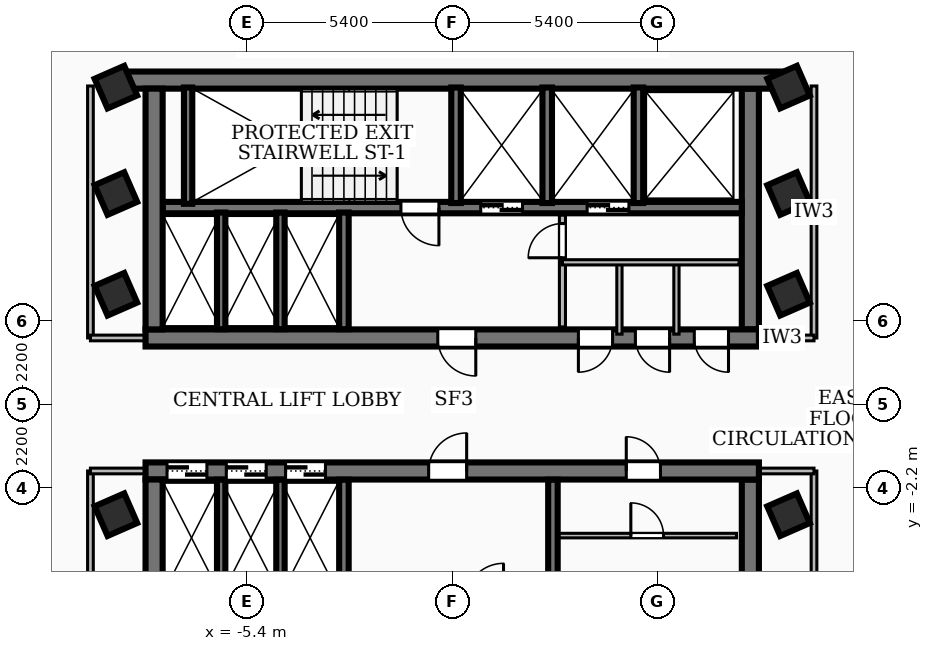
"""IFC4 building model, lengths in metres.
Left out: names, types, materials, properties, quantities, classifications, styles, units other than length and angle.
Written with IfcOpenShell. Run it as: python <this file> out.ifc"""

import sys

from ifc_helpers import new_model, si_unit, direction, frame, frame_2d, origin, origin_2d, place, context, subcontext, project, spatial, rectangle, extrude, element, fill, save


model = new_model("IFC4")
c1 = context("Model", 3, precision=1e-05, world=origin(), true_north=direction((0.0, 1.0)))
c2 = subcontext(c1, "Body", "Model", "MODEL_VIEW")
j1 = project(units=[si_unit("LENGTHUNIT", "METRE"), si_unit("PLANEANGLEUNIT", "RADIAN")], contexts=[c1])
p1 = place(None, origin())
s1 = spatial("IfcSite", under=j1, at=p1, CompositionType="ELEMENT")
p2 = place(p1, origin())
s2 = spatial("IfcBuilding", under=s1, at=p2, CompositionType="ELEMENT")
p3 = place(p2, frame((0.0, 0.0, 181.08)))
s3 = spatial("IfcBuildingStorey", under=s2, at=p3, CompositionType="ELEMENT", Elevation=181.08)
p4 = place(p3, frame((-8.78, 8.535, 0.0), z_axis=(0.0, 0.0, 1.0), x_axis=(1.0, 0.0, 0.0)))
e1 = element("IfcWall", 1, at=p4, inside=s3, PredefinedType="SHEAR", context=c2, shape_type="SweptSolid", body=[
    extrude(rectangle(XDim=17.56, YDim=0.45, at=frame_2d((8.78, 0.0))), origin(), (0.0, 0.0, 1.0), 3.34),
])
p5 = place(p3, frame((8.07, 1.75, 0.0), z_axis=(0.0, 0.0, 1.0), x_axis=(-1.0, 0.0, 0.0)))
e2 = element("IfcWall", 2, at=p5, inside=s3, PredefinedType="SHEAR", context=c2, shape_type="SweptSolid", body=[
    extrude(rectangle(XDim=16.14, YDim=0.45, at=frame_2d((8.07, 0.0))), origin(), (0.0, 0.0, 1.0), 3.34),
])
p6 = place(p5, frame((7.45, 0.0, 0.0)))
e3 = element("IfcOpeningElement", 3, at=p6, cuts=e2, PredefinedType="OPENING", context=c2, shape_type="SweptSolid", body=[
    extrude(rectangle(XDim=1.0, YDim=2.1, at=frame_2d((0.5, 1.05))), frame((0.0, 0.235, 0.0), z_axis=(0.0, -1.0, 0.0), x_axis=(1.0, 0.0, 0.0)), (0.0, 0.0, 1.0), 0.47),
])
p7 = place(p5, frame((3.85, 0.0, 0.0)))
e4 = element("IfcOpeningElement", 4, at=p7, cuts=e2, PredefinedType="OPENING", context=c2, shape_type="SweptSolid", body=[
    extrude(rectangle(XDim=0.9, YDim=2.06, at=frame_2d((0.45, 1.03))), frame((0.0, 0.235, 0.0), z_axis=(0.0, -1.0, 0.0), x_axis=(1.0, 0.0, 0.0)), (0.0, 0.0, 1.0), 0.47),
])
p8 = place(p5, frame((2.35, 0.0, 0.0)))
e5 = element("IfcOpeningElement", 5, at=p8, cuts=e2, PredefinedType="OPENING", context=c2, shape_type="SweptSolid", body=[
    extrude(rectangle(XDim=0.9, YDim=2.06, at=frame_2d((0.45, 1.03))), frame((0.0, 0.235, 0.0), z_axis=(0.0, -1.0, 0.0), x_axis=(1.0, 0.0, 0.0)), (0.0, 0.0, 1.0), 0.47),
])
p9 = place(p5, frame((0.8, 0.0, 0.0)))
e6 = element("IfcOpeningElement", 6, at=p9, cuts=e2, PredefinedType="OPENING", context=c2, shape_type="SweptSolid", body=[
    extrude(rectangle(XDim=0.9, YDim=2.06, at=frame_2d((0.45, 1.03))), frame((0.0, 0.235, 0.0), z_axis=(0.0, -1.0, 0.0), x_axis=(1.0, 0.0, 0.0)), (0.0, 0.0, 1.0), 0.47),
])
for number, where, z_axis, x_axis in (
    (7, (-7.845, 1.975, 0.0), (0.0, 0.0, 1.0), (0.0, 1.0, 0.0)),
    (8, (7.845, 8.31, 0.0), (0.0, 0.0, 1.0), (0.0, -1.0, 0.0)),
):
    element("IfcWall", number, at=place(p3, frame(where, z_axis=z_axis, x_axis=x_axis)), inside=s3, PredefinedType="SHEAR", context=c2, shape_type="SweptSolid", body=[
        extrude(rectangle(XDim=6.335, YDim=0.45, at=frame_2d((3.167, 0.0))), origin(), (0.0, 0.0, 1.0), 3.34),
    ])
p10 = place(p3, frame((7.62, 5.18, 0.0), z_axis=(0.0, 0.0, 1.0), x_axis=(-1.0, 0.0, 0.0)))
e9 = element("IfcWall", 9, at=p10, inside=s3, PredefinedType="SOLIDWALL", context=c2, shape_type="SweptSolid", body=[
    extrude(rectangle(XDim=15.24, YDim=0.3, at=frame_2d((7.62, 0.0))), origin(), (0.0, 0.0, 1.0), 3.34),
])
p11 = place(p10, frame((5.77, 0.0, 0.0)))
e10 = element("IfcOpeningElement", 10, at=p11, cuts=e9, PredefinedType="OPENING", context=c2, shape_type="SweptSolid", body=[
    extrude(rectangle(XDim=1.1, YDim=2.15, at=frame_2d((0.55, 1.075))), frame((0.0, 0.16, 0.0), z_axis=(0.0, -1.0, 0.0), x_axis=(1.0, 0.0, 0.0)), (0.0, 0.0, 1.0), 0.32),
])
p12 = place(p10, frame((2.97, 0.0, 0.0)))
e11 = element("IfcOpeningElement", 11, at=p12, cuts=e9, PredefinedType="OPENING", context=c2, shape_type="SweptSolid", body=[
    extrude(rectangle(XDim=1.1, YDim=2.15, at=frame_2d((0.55, 1.075))), frame((0.0, 0.16, 0.0), z_axis=(0.0, -1.0, 0.0), x_axis=(1.0, 0.0, 0.0)), (0.0, 0.0, 1.0), 0.32),
])
p13 = place(p10, frame((7.97, 0.0, 0.0)))
e12 = element("IfcOpeningElement", 12, at=p13, cuts=e9, PredefinedType="OPENING", context=c2, shape_type="SweptSolid", body=[
    extrude(rectangle(XDim=1.0, YDim=2.1, at=frame_2d((0.5, 1.05))), frame((0.0, 0.16, 0.0), z_axis=(0.0, -1.0, 0.0), x_axis=(1.0, 0.0, 0.0)), (0.0, 0.0, 1.0), 0.32),
])
p14 = place(p3, frame((-8.07, -1.75, 0.0), z_axis=(0.0, 0.0, 1.0), x_axis=(1.0, 0.0, 0.0)))
e13 = element("IfcWall", 13, at=p14, inside=s3, PredefinedType="SHEAR", context=c2, shape_type="SweptSolid", body=[
    extrude(rectangle(XDim=16.14, YDim=0.45, at=frame_2d((8.07, 0.0))), origin(), (0.0, 0.0, 1.0), 3.34),
])
p15 = place(p14, frame((7.45, 0.0, 0.0)))
e14 = element("IfcOpeningElement", 14, at=p15, cuts=e13, PredefinedType="OPENING", context=c2, shape_type="SweptSolid", body=[
    extrude(rectangle(XDim=1.0, YDim=2.1, at=frame_2d((0.5, 1.05))), frame((0.0, 0.235, 0.0), z_axis=(0.0, -1.0, 0.0), x_axis=(1.0, 0.0, 0.0)), (0.0, 0.0, 1.0), 0.47),
])
p16 = place(p14, frame((12.65, 0.0, 0.0)))
e15 = element("IfcOpeningElement", 15, at=p16, cuts=e13, PredefinedType="OPENING", context=c2, shape_type="SweptSolid", body=[
    extrude(rectangle(XDim=0.9, YDim=2.06, at=frame_2d((0.45, 1.03))), frame((0.0, 0.235, 0.0), z_axis=(0.0, -1.0, 0.0), x_axis=(1.0, 0.0, 0.0)), (0.0, 0.0, 1.0), 0.47),
])
p17 = place(p14, frame((0.565, 0.0, 0.0)))
e16 = element("IfcOpeningElement", 16, at=p17, cuts=e13, PredefinedType="OPENING", context=c2, shape_type="SweptSolid", body=[
    extrude(rectangle(XDim=1.05, YDim=2.15, at=frame_2d((0.525, 1.075))), frame((0.0, 0.235, 0.0), z_axis=(0.0, -1.0, 0.0), x_axis=(1.0, 0.0, 0.0)), (0.0, 0.0, 1.0), 0.47),
])
p18 = place(p14, frame((2.125, 0.0, 0.0)))
e17 = element("IfcOpeningElement", 17, at=p18, cuts=e13, PredefinedType="OPENING", context=c2, shape_type="SweptSolid", body=[
    extrude(rectangle(XDim=1.05, YDim=2.15, at=frame_2d((0.525, 1.075))), frame((0.0, 0.235, 0.0), z_axis=(0.0, -1.0, 0.0), x_axis=(1.0, 0.0, 0.0)), (0.0, 0.0, 1.0), 0.47),
])
p19 = place(p14, frame((3.685, 0.0, 0.0)))
e18 = element("IfcOpeningElement", 18, at=p19, cuts=e13, PredefinedType="OPENING", context=c2, shape_type="SweptSolid", body=[
    extrude(rectangle(XDim=1.05, YDim=2.15, at=frame_2d((0.525, 1.075))), frame((0.0, 0.235, 0.0), z_axis=(0.0, -1.0, 0.0), x_axis=(1.0, 0.0, 0.0)), (0.0, 0.0, 1.0), 0.47),
])
for number, where, z_axis, x_axis in (
    (19, (-7.845, -8.31, 0.0), (0.0, 0.0, 1.0), (0.0, 1.0, 0.0)),
    (20, (7.845, -1.975, 0.0), (0.0, 0.0, 1.0), (0.0, -1.0, 0.0)),
):
    element("IfcWall", number, at=place(p3, frame(where, z_axis=z_axis, x_axis=x_axis)), inside=s3, PredefinedType="SHEAR", context=c2, shape_type="SweptSolid", body=[
        extrude(rectangle(XDim=6.335, YDim=0.45, at=frame_2d((3.167, 0.0))), origin(), (0.0, 0.0, 1.0), 3.34),
    ])
p20 = place(p3, frame((-6.95, 5.28, 0.0), z_axis=(0.0, 0.0, 1.0), x_axis=(0.0, 1.0, 0.0)))
e21 = element("IfcWall", 21, at=p20, inside=s3, PredefinedType="SOLIDWALL", context=c2, shape_type="SweptSolid", body=[
    extrude(rectangle(XDim=3.06, YDim=0.22, at=frame_2d((1.53, 0.0))), origin(), (0.0, 0.0, 1.0), 3.34),
])
for number, where, z_axis, x_axis in (
    (22, (0.1, 5.3, 0.0), (0.0, 0.0, 1.0), (0.0, 1.0, 0.0)),
    (23, (2.5, 5.3, 0.0), (0.0, 0.0, 1.0), (0.0, 1.0, 0.0)),
    (24, (4.9, 5.3, 0.0), (0.0, 0.0, 1.0), (0.0, 1.0, 0.0)),
):
    element("IfcWall", number, at=place(p3, frame(where, z_axis=z_axis, x_axis=x_axis)), inside=s3, PredefinedType="SOLIDWALL", context=c2, shape_type="SweptSolid", body=[
        extrude(rectangle(XDim=3.04, YDim=0.25, at=frame_2d((1.52, 0.0))), origin(), (0.0, 0.0, 1.0), 3.34),
    ])
for number, where, z_axis, x_axis in (
    (25, (-2.85, 1.98, 0.0), (0.0, 0.0, 1.0), (0.0, 1.0, 0.0)),
    (26, (-2.85, -5.05, 0.0), (0.0, 0.0, 1.0), (0.0, 1.0, 0.0)),
    (27, (2.65, -5.05, 0.0), (0.0, 0.0, 1.0), (0.0, 1.0, 0.0)),
):
    element("IfcWall", number, at=place(p3, frame(where, z_axis=z_axis, x_axis=x_axis)), inside=s3, PredefinedType="SOLIDWALL", context=c2, shape_type="SweptSolid", body=[
        extrude(rectangle(XDim=3.07, YDim=0.25, at=frame_2d((1.535, 0.0))), origin(), (0.0, 0.0, 1.0), 3.34),
    ])
for number, where, z_axis, x_axis in (
    (28, (-6.08, 1.98, 0.0), (0.0, 0.0, 1.0), (0.0, 1.0, 0.0)),
    (29, (-4.52, 1.98, 0.0), (0.0, 0.0, 1.0), (0.0, 1.0, 0.0)),
    (30, (-6.08, -5.05, 0.0), (0.0, 0.0, 1.0), (0.0, 1.0, 0.0)),
    (31, (-4.52, -5.05, 0.0), (0.0, 0.0, 1.0), (0.0, 1.0, 0.0)),
):
    element("IfcWall", number, at=place(p3, frame(where, z_axis=z_axis, x_axis=x_axis)), inside=s3, PredefinedType="SOLIDWALL", context=c2, shape_type="SweptSolid", body=[
        extrude(rectangle(XDim=3.07, YDim=0.22, at=frame_2d((1.535, 0.0))), origin(), (0.0, 0.0, 1.0), 3.34),
    ])
for number, where, z_axis, x_axis in (
    (32, (-8.85, -2.9, 0.0), (0.0, 0.0, 1.0), (0.916, 0.4, 0.0)),
    (33, (-8.85, 2.9, 0.0), (0.0, 0.0, 1.0), (0.916, 0.4, 0.0)),
    (34, (-8.85, 5.55, 0.0), (0.0, 0.0, 1.0), (0.916, 0.4, 0.0)),
    (35, (8.85, -2.9, 0.0), (0.0, 0.0, 1.0), (0.916, 0.4, 0.0)),
    (36, (8.85, 2.9, 0.0), (0.0, 0.0, 1.0), (0.916, 0.4, 0.0)),
    (37, (8.85, 5.55, 0.0), (0.0, 0.0, 1.0), (0.916, 0.4, 0.0)),
    (38, (-8.85, 8.35, 0.0), (0.0, 0.0, 1.0), (0.916, 0.4, 0.0)),
    (39, (8.85, 8.35, 0.0), (0.0, 0.0, 1.0), (0.916, 0.4, 0.0)),
):
    element("IfcColumn", number, at=place(p3, frame(where, z_axis=z_axis, x_axis=x_axis)), inside=s3, PredefinedType="COLUMN", context=c2, shape_type="SweptSolid", body=[
        extrude(rectangle(XDim=0.85, YDim=0.85, at=origin_2d()), origin(), (0.0, 0.0, 1.0), 3.6),
    ])
p21 = place(p3, frame((2.9, 2.04, 0.0), z_axis=(0.0, 0.0, 1.0), x_axis=(0.0, 1.0, 0.0)))
e40 = element("IfcWall", 40, at=p21, inside=s3, PredefinedType="PARTITIONING", context=c2, shape_type="SweptSolid", body=[
    extrude(rectangle(XDim=2.94, YDim=0.16, at=frame_2d((1.47, 0.0))), origin(), (0.0, 0.0, 1.0), 2.57),
])
p22 = place(p21, frame((1.82, 0.0, 0.0)))
e41 = element("IfcOpeningElement", 41, at=p22, cuts=e40, PredefinedType="OPENING", context=c2, shape_type="SweptSolid", body=[
    extrude(rectangle(XDim=0.9, YDim=2.06, at=frame_2d((0.45, 1.03))), frame((0.0, 0.09, 0.0), z_axis=(0.0, -1.0, 0.0), x_axis=(1.0, 0.0, 0.0)), (0.0, 0.0, 1.0), 0.18),
])
p23 = place(p3, frame((2.9, 3.74, 0.0), z_axis=(0.0, 0.0, 1.0), x_axis=(1.0, 0.0, 0.0)))
e42 = element("IfcWall", 42, at=p23, inside=s3, PredefinedType="PARTITIONING", context=c2, shape_type="SweptSolid", body=[
    extrude(rectangle(XDim=4.65, YDim=0.138, at=frame_2d((2.325, 0.0))), origin(), (0.0, 0.0, 1.0), 3.34),
])
p24 = place(p3, frame((2.8, -3.45, 0.0), z_axis=(0.0, 0.0, 1.0), x_axis=(1.0, 0.0, 0.0)))
e43 = element("IfcWall", 43, at=p24, inside=s3, PredefinedType="PARTITIONING", context=c2, shape_type="SweptSolid", body=[
    extrude(rectangle(XDim=4.68, YDim=0.12, at=frame_2d((2.34, 0.0))), origin(), (0.0, 0.0, 1.0), 3.34),
])
p25 = place(p24, frame((1.9, 0.0, 0.0)))
e44 = element("IfcOpeningElement", 44, at=p25, cuts=e43, PredefinedType="OPENING", context=c2, shape_type="SweptSolid", body=[
    extrude(rectangle(XDim=0.86, YDim=2.04, at=frame_2d((0.43, 1.02))), frame((0.0, 0.07, 0.0), z_axis=(0.0, -1.0, 0.0), x_axis=(1.0, 0.0, 0.0)), (0.0, 0.0, 1.0), 0.14),
])
for number, where, z_axis, x_axis in (
    (45, (4.4, 1.85, 0.0), (0.0, 0.0, 1.0), (0.0, 1.0, 0.0)),
    (46, (5.9, 1.85, 0.0), (0.0, 0.0, 1.0), (0.0, 1.0, 0.0)),
):
    element("IfcWall", number, at=place(p3, frame(where, z_axis=z_axis, x_axis=x_axis)), inside=s3, PredefinedType="PARTITIONING", context=c2, shape_type="SweptSolid", body=[
        extrude(rectangle(XDim=1.89, YDim=0.138, at=frame_2d((0.945, 0.0))), origin(), (0.0, 0.0, 1.0), 2.57),
    ])
p26 = place(p3, frame((-9.52, 1.75, 0.0), z_axis=(0.0, 0.0, 1.0), x_axis=(0.0, 1.0, 0.0)))
e47 = element("IfcWall", 47, at=p26, inside=s3, PredefinedType="PARTITIONING", context=c2, shape_type="SweptSolid", body=[
    extrude(rectangle(XDim=6.63, YDim=0.15, at=frame_2d((3.315, 0.0))), origin(), (0.0, 0.0, 1.0), 3.34),
])
p27 = place(p3, frame((-7.85, 1.75, 0.0), z_axis=(0.0, 0.0, 1.0), x_axis=(-1.0, 0.0, 0.0)))
e48 = element("IfcWall", 48, at=p27, inside=s3, PredefinedType="PARTITIONING", context=c2, shape_type="SweptSolid", body=[
    extrude(rectangle(XDim=1.67, YDim=0.15, at=frame_2d((0.835, 0.0))), origin(), (0.0, 0.0, 1.0), 2.57),
])
p28 = place(p3, frame((-9.52, -8.38, 0.0), z_axis=(0.0, 0.0, 1.0), x_axis=(0.0, 1.0, 0.0)))
e49 = element("IfcWall", 49, at=p28, inside=s3, PredefinedType="PARTITIONING", context=c2, shape_type="SweptSolid", body=[
    extrude(rectangle(XDim=6.63, YDim=0.15, at=frame_2d((3.315, 0.0))), origin(), (0.0, 0.0, 1.0), 2.644),
])
p29 = place(p3, frame((-7.85, -1.75, 0.0), z_axis=(0.0, 0.0, 1.0), x_axis=(-1.0, 0.0, 0.0)))
e50 = element("IfcWall", 50, at=p29, inside=s3, PredefinedType="PARTITIONING", context=c2, shape_type="SweptSolid", body=[
    extrude(rectangle(XDim=1.67, YDim=0.15, at=frame_2d((0.835, 0.0))), origin(), (0.0, 0.0, 1.0), 2.57),
])
p30 = place(p3, frame((9.52, 1.75, 0.0), z_axis=(0.0, 0.0, 1.0), x_axis=(0.0, 1.0, 0.0)))
e51 = element("IfcWall", 51, at=p30, inside=s3, PredefinedType="PARTITIONING", context=c2, shape_type="SweptSolid", body=[
    extrude(rectangle(XDim=6.63, YDim=0.15, at=frame_2d((3.315, 0.0))), origin(), (0.0, 0.0, 1.0), 2.644),
])
p31 = place(p3, frame((7.85, 1.75, 0.0), z_axis=(0.0, 0.0, 1.0), x_axis=(1.0, 0.0, 0.0)))
e52 = element("IfcWall", 52, at=p31, inside=s3, PredefinedType="PARTITIONING", context=c2, shape_type="SweptSolid", body=[
    extrude(rectangle(XDim=1.67, YDim=0.15, at=frame_2d((0.835, 0.0))), origin(), (0.0, 0.0, 1.0), 2.57),
])
p32 = place(p3, frame((9.52, -8.38, 0.0), z_axis=(0.0, 0.0, 1.0), x_axis=(0.0, 1.0, 0.0)))
e53 = element("IfcWall", 53, at=p32, inside=s3, PredefinedType="PARTITIONING", context=c2, shape_type="SweptSolid", body=[
    extrude(rectangle(XDim=6.63, YDim=0.15, at=frame_2d((3.315, 0.0))), origin(), (0.0, 0.0, 1.0), 3.34),
])
p33 = place(p3, frame((7.85, -1.75, 0.0), z_axis=(0.0, 0.0, 1.0), x_axis=(1.0, 0.0, 0.0)))
e54 = element("IfcWall", 54, at=p33, inside=s3, PredefinedType="PARTITIONING", context=c2, shape_type="SweptSolid", body=[
    extrude(rectangle(XDim=1.67, YDim=0.15, at=frame_2d((0.835, 0.0))), origin(), (0.0, 0.0, 1.0), 2.57),
])
p34 = place(p3, frame((8.915, 15.288, 0.0), z_axis=(0.0, 0.0, 1.0), x_axis=(0.400335531383, -0.916368627962, 0.0)))
e55 = element("IfcWall", 55, at=p34, inside=s3, PredefinedType="PARTITIONING", context=c2, shape_type="SweptSolid", body=[
    extrude(rectangle(XDim=20.46, YDim=0.12, at=frame_2d((10.23, 0.0))), origin(), (0.0, 0.0, 1.0), 2.644),
])
p35 = place(p34, frame((9.84, 0.0, 0.0)))
e56 = element("IfcOpeningElement", 56, at=p35, cuts=e55, PredefinedType="OPENING", context=c2, shape_type="SweptSolid", body=[
    extrude(rectangle(XDim=1.2, YDim=2.1, at=frame_2d((0.6, 1.05))), frame((0.0, 0.07, 0.0), z_axis=(0.0, -1.0, 0.0), x_axis=(1.0, 0.0, 0.0)), (0.0, 0.0, 1.0), 0.14),
])
p36 = place(p3, frame((-15.288, 8.915, 0.0), z_axis=(0.0, 0.0, 1.0), x_axis=(0.916368627962, 0.400335531383, 0.0)))
e57 = element("IfcWall", 57, at=p36, inside=s3, PredefinedType="PARTITIONING", context=c2, shape_type="SweptSolid", body=[
    extrude(rectangle(XDim=20.46, YDim=0.12, at=frame_2d((10.23, 0.0))), origin(), (0.0, 0.0, 1.0), 2.644),
])
p37 = place(p36, frame((9.84, 0.0, 0.0)))
e58 = element("IfcOpeningElement", 58, at=p37, cuts=e57, PredefinedType="OPENING", context=c2, shape_type="SweptSolid", body=[
    extrude(rectangle(XDim=1.2, YDim=2.1, at=frame_2d((0.6, 1.05))), frame((0.0, 0.07, 0.0), z_axis=(0.0, -1.0, 0.0), x_axis=(1.0, 0.0, 0.0)), (0.0, 0.0, 1.0), 0.14),
])
p38 = place(p3, frame((-8.915, -15.288, 0.0), z_axis=(0.0, 0.0, 1.0), x_axis=(-0.400335531383, 0.916368627962, 0.0)))
e59 = element("IfcWall", 59, at=p38, inside=s3, PredefinedType="PARTITIONING", context=c2, shape_type="SweptSolid", body=[
    extrude(rectangle(XDim=20.46, YDim=0.12, at=frame_2d((10.23, 0.0))), origin(), (0.0, 0.0, 1.0), 2.644),
])
p39 = place(p38, frame((9.84, 0.0, 0.0)))
e60 = element("IfcOpeningElement", 60, at=p39, cuts=e59, PredefinedType="OPENING", context=c2, shape_type="SweptSolid", body=[
    extrude(rectangle(XDim=1.2, YDim=2.1, at=frame_2d((0.6, 1.05))), frame((0.0, 0.07, 0.0), z_axis=(0.0, -1.0, 0.0), x_axis=(1.0, 0.0, 0.0)), (0.0, 0.0, 1.0), 0.14),
])
p40 = place(p6, origin())
e61 = element("IfcDoor", 61, at=p40, inside=s3, OperationType="SINGLE_SWING_LEFT", PredefinedType="DOOR", context=c2, shape_type="SweptSolid", body=[
    extrude(rectangle(XDim=1.0, YDim=2.1, at=frame_2d((0.5, 1.05))), frame((0.0, 0.025, 0.0), z_axis=(0.0, -1.0, 0.0), x_axis=(1.0, 0.0, 0.0)), (0.0, 0.0, 1.0), 0.05),
])
fill(e3, e61)
p41 = place(p15, origin())
e62 = element("IfcDoor", 62, at=p41, inside=s3, OperationType="SINGLE_SWING_RIGHT", PredefinedType="DOOR", context=c2, shape_type="SweptSolid", body=[
    extrude(rectangle(XDim=1.0, YDim=2.1, at=frame_2d((0.5, 1.05))), frame((0.0, 0.025, 0.0), z_axis=(0.0, -1.0, 0.0), x_axis=(1.0, 0.0, 0.0)), (0.0, 0.0, 1.0), 0.05),
])
fill(e14, e62)
p42 = place(p11, origin())
e63 = element("IfcDoor", 63, at=p42, inside=s3, OperationType="DOUBLE_DOOR_SLIDING", PredefinedType="DOOR", context=c2, shape_type="SweptSolid", body=[
    extrude(rectangle(XDim=1.1, YDim=2.15, at=frame_2d((0.55, 1.075))), frame((0.0, 0.025, 0.0), z_axis=(0.0, -1.0, 0.0), x_axis=(1.0, 0.0, 0.0)), (0.0, 0.0, 1.0), 0.05),
])
fill(e10, e63)
p43 = place(p12, origin())
e64 = element("IfcDoor", 64, at=p43, inside=s3, OperationType="DOUBLE_DOOR_SLIDING", PredefinedType="DOOR", context=c2, shape_type="SweptSolid", body=[
    extrude(rectangle(XDim=1.1, YDim=2.15, at=frame_2d((0.55, 1.075))), frame((0.0, 0.025, 0.0), z_axis=(0.0, -1.0, 0.0), x_axis=(1.0, 0.0, 0.0)), (0.0, 0.0, 1.0), 0.05),
])
fill(e11, e64)
p44 = place(p13, origin())
e65 = element("IfcDoor", 65, at=p44, inside=s3, OperationType="SINGLE_SWING_LEFT", PredefinedType="DOOR", context=c2, shape_type="SweptSolid", body=[
    extrude(rectangle(XDim=1.0, YDim=2.1, at=frame_2d((0.5, 1.05))), frame((0.0, 0.025, 0.0), z_axis=(0.0, -1.0, 0.0), x_axis=(1.0, 0.0, 0.0)), (0.0, 0.0, 1.0), 0.05),
])
fill(e12, e65)
p45 = place(p16, origin())
e66 = element("IfcDoor", 66, at=p45, inside=s3, OperationType="SINGLE_SWING_LEFT", PredefinedType="DOOR", context=c2, shape_type="SweptSolid", body=[
    extrude(rectangle(XDim=0.9, YDim=2.06, at=frame_2d((0.45, 1.03))), frame((0.0, 0.025, 0.0), z_axis=(0.0, -1.0, 0.0), x_axis=(1.0, 0.0, 0.0)), (0.0, 0.0, 1.0), 0.05),
])
fill(e15, e66)
p46 = place(p17, origin())
e67 = element("IfcDoor", 67, at=p46, inside=s3, OperationType="DOUBLE_DOOR_SLIDING", PredefinedType="DOOR", context=c2, shape_type="SweptSolid", body=[
    extrude(rectangle(XDim=1.05, YDim=2.15, at=frame_2d((0.525, 1.075))), frame((0.0, 0.025, 0.0), z_axis=(0.0, -1.0, 0.0), x_axis=(1.0, 0.0, 0.0)), (0.0, 0.0, 1.0), 0.05),
])
fill(e16, e67)
p47 = place(p18, origin())
e68 = element("IfcDoor", 68, at=p47, inside=s3, OperationType="DOUBLE_DOOR_SLIDING", PredefinedType="DOOR", context=c2, shape_type="SweptSolid", body=[
    extrude(rectangle(XDim=1.05, YDim=2.15, at=frame_2d((0.525, 1.075))), frame((0.0, 0.025, 0.0), z_axis=(0.0, -1.0, 0.0), x_axis=(1.0, 0.0, 0.0)), (0.0, 0.0, 1.0), 0.05),
])
fill(e17, e68)
p48 = place(p19, origin())
e69 = element("IfcDoor", 69, at=p48, inside=s3, OperationType="DOUBLE_DOOR_SLIDING", PredefinedType="DOOR", context=c2, shape_type="SweptSolid", body=[
    extrude(rectangle(XDim=1.05, YDim=2.15, at=frame_2d((0.525, 1.075))), frame((0.0, 0.025, 0.0), z_axis=(0.0, -1.0, 0.0), x_axis=(1.0, 0.0, 0.0)), (0.0, 0.0, 1.0), 0.05),
])
fill(e18, e69)
p49 = place(p7, origin())
e70 = element("IfcDoor", 70, at=p49, inside=s3, OperationType="SINGLE_SWING_RIGHT", PredefinedType="DOOR", context=c2, shape_type="SweptSolid", body=[
    extrude(rectangle(XDim=0.9, YDim=2.06, at=frame_2d((0.45, 1.03))), frame((0.0, 0.025, 0.0), z_axis=(0.0, -1.0, 0.0), x_axis=(1.0, 0.0, 0.0)), (0.0, 0.0, 1.0), 0.05),
])
fill(e4, e70)
p50 = place(p8, origin())
e71 = element("IfcDoor", 71, at=p50, inside=s3, OperationType="SINGLE_SWING_LEFT", PredefinedType="DOOR", context=c2, shape_type="SweptSolid", body=[
    extrude(rectangle(XDim=0.9, YDim=2.06, at=frame_2d((0.45, 1.03))), frame((0.0, 0.025, 0.0), z_axis=(0.0, -1.0, 0.0), x_axis=(1.0, 0.0, 0.0)), (0.0, 0.0, 1.0), 0.05),
])
fill(e5, e71)
p51 = place(p9, origin())
e72 = element("IfcDoor", 72, at=p51, inside=s3, OperationType="SINGLE_SWING_LEFT", PredefinedType="DOOR", context=c2, shape_type="SweptSolid", body=[
    extrude(rectangle(XDim=0.9, YDim=2.06, at=frame_2d((0.45, 1.03))), frame((0.0, 0.025, 0.0), z_axis=(0.0, -1.0, 0.0), x_axis=(1.0, 0.0, 0.0)), (0.0, 0.0, 1.0), 0.05),
])
fill(e6, e72)
p52 = place(p22, origin())
e73 = element("IfcDoor", 73, at=p52, inside=s3, OperationType="SINGLE_SWING_LEFT", PredefinedType="DOOR", context=c2, shape_type="SweptSolid", body=[
    extrude(rectangle(XDim=0.9, YDim=2.06, at=frame_2d((0.45, 1.03))), frame((0.0, 0.025, 0.0), z_axis=(0.0, -1.0, 0.0), x_axis=(1.0, 0.0, 0.0)), (0.0, 0.0, 1.0), 0.05),
])
fill(e41, e73)
p53 = place(p25, origin())
e74 = element("IfcDoor", 74, at=p53, inside=s3, OperationType="SINGLE_SWING_LEFT", PredefinedType="DOOR", context=c2, shape_type="SweptSolid", body=[
    extrude(rectangle(XDim=0.86, YDim=2.04, at=frame_2d((0.43, 1.02))), frame((0.0, 0.025, 0.0), z_axis=(0.0, -1.0, 0.0), x_axis=(1.0, 0.0, 0.0)), (0.0, 0.0, 1.0), 0.05),
])
fill(e44, e74)
save(model, sys.argv[1])
